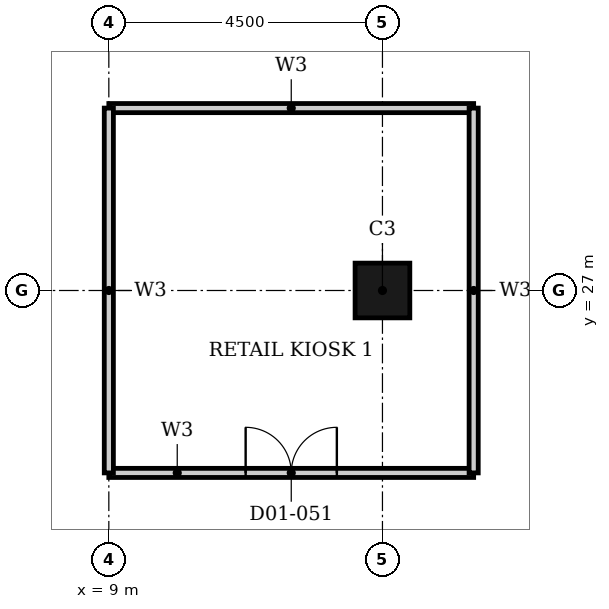
"""IFC4 building model, lengths in metres.
Left out: names, types, materials, properties, quantities, classifications, styles, units other than length and angle.
Written with IfcOpenShell. Run it as: python <this file> out.ifc"""

import sys

from ifc_helpers import new_model, si_unit, direction, frame, frame_2d, origin, origin_2d, place, context, subcontext, project, spatial, rectangle, hollow_rectangle, extrude, element, fill, save


model = new_model("IFC4")
c1 = context("Model", 3, precision=1e-05, world=origin(), true_north=direction((0.0, 1.0)))
c2 = subcontext(c1, "Body", "Model", "MODEL_VIEW")
j1 = project(units=[si_unit("LENGTHUNIT", "METRE"), si_unit("PLANEANGLEUNIT", "RADIAN")], contexts=[c1])
p1 = place(None, origin())
s1 = spatial("IfcSite", under=j1, at=p1, CompositionType="ELEMENT")
p2 = place(p1, origin())
s2 = spatial("IfcBuilding", under=s1, at=p2, CompositionType="ELEMENT")
p3 = place(p2, frame((0.0, 0.0, 6.6)))
s3 = spatial("IfcBuildingStorey", under=s2, at=p3, CompositionType="ELEMENT", Elevation=6.6)
p4 = place(p3, frame((13.5, 27.0, 0.0), z_axis=(0.0, 0.0, 1.0), x_axis=(1.0, 0.0, 0.0)))
e1 = element("IfcColumn", 1, at=p4, inside=s3, PredefinedType="COLUMN", context=c2, shape_type="SweptSolid", body=[
    extrude(hollow_rectangle(XDim=0.9, YDim=0.9, WallThickness=0.028, at=origin_2d()), origin(), (0.0, 0.0, 1.0), 5.4),
])
p5 = place(p3, frame((9.0, 24.0, 0.0), z_axis=(0.0, 0.0, 1.0), x_axis=(1.0, 0.0, 0.0)))
e2 = element("IfcWall", 2, at=p5, inside=s3, PredefinedType="PARTITIONING", context=c2, shape_type="SweptSolid", body=[
    extrude(rectangle(XDim=6.0, YDim=0.15, at=frame_2d((3.0, 0.0))), origin(), (0.0, 0.0, 1.0), 5.05),
])
p6 = place(p5, frame((2.25, 0.0, 0.0)))
e3 = element("IfcOpeningElement", 3, at=p6, cuts=e2, PredefinedType="OPENING", context=c2, shape_type="SweptSolid", body=[
    extrude(rectangle(XDim=1.5, YDim=2.4, at=frame_2d((0.75, 1.2))), frame((0.0, 0.085, 0.0), z_axis=(0.0, -1.0, 0.0), x_axis=(1.0, 0.0, 0.0)), (0.0, 0.0, 1.0), 0.17),
])
for number, where, z_axis, x_axis in (
    (4, (9.0, 30.0, 0.0), (0.0, 0.0, 1.0), (1.0, 0.0, 0.0)),
    (5, (15.0, 24.0, 0.0), (0.0, 0.0, 1.0), (0.0, 1.0, 0.0)),
    (6, (9.0, 24.0, 0.0), (0.0, 0.0, 1.0), (0.0, 1.0, 0.0)),
):
    element("IfcWall", number, at=place(p3, frame(where, z_axis=z_axis, x_axis=x_axis)), inside=s3, PredefinedType="PARTITIONING", context=c2, shape_type="SweptSolid", body=[
        extrude(rectangle(XDim=6.0, YDim=0.15, at=frame_2d((3.0, 0.0))), origin(), (0.0, 0.0, 1.0), 5.05),
    ])
p7 = place(p6, origin())
e7 = element("IfcDoor", 7, at=p7, inside=s3, OperationType="DOUBLE_DOOR_SINGLE_SWING", PredefinedType="DOOR", context=c2, shape_type="SweptSolid", body=[
    extrude(rectangle(XDim=1.5, YDim=2.4, at=frame_2d((0.75, 1.2))), frame((0.0, 0.025, 0.0), z_axis=(0.0, -1.0, 0.0), x_axis=(1.0, 0.0, 0.0)), (0.0, 0.0, 1.0), 0.05),
])
fill(e3, e7)
save(model, sys.argv[1])
